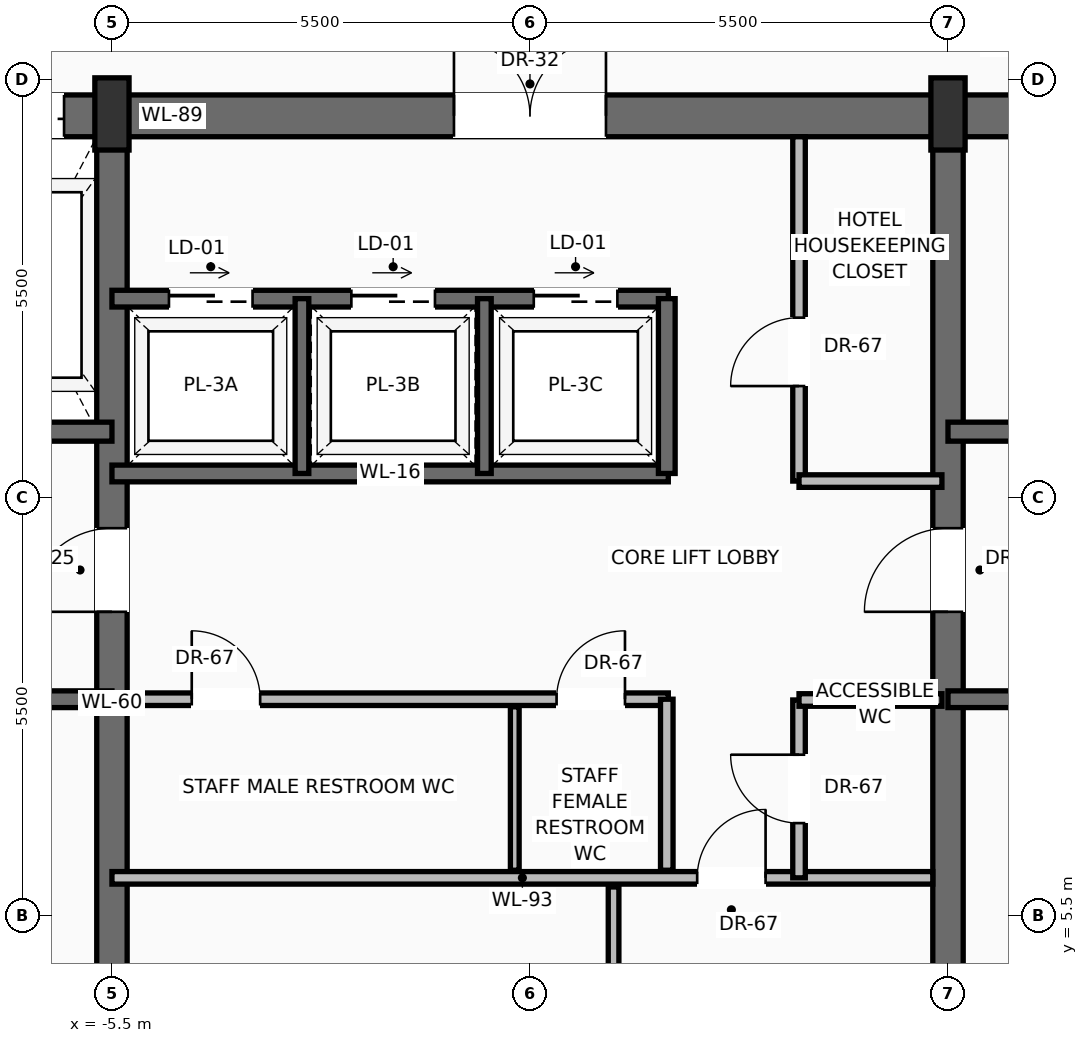
"""IFC4 building model, lengths in metres.
Left out: names, types, materials, properties, quantities, classifications, styles, units other than length and angle.
Written with IfcOpenShell. Run it as: python <this file> out.ifc"""

import sys

from ifc_helpers import new_model, si_unit, direction, frame, frame_2d, origin, origin_2d, place, context, subcontext, project, spatial, rectangle, extrude, source, transform, mapped, element, fill, save


model = new_model("IFC4")
c1 = context("Model", 3, precision=1e-05, world=origin(), true_north=direction((0.0, 1.0)))
c2 = subcontext(c1, "Body", "Model", "MODEL_VIEW")
j1 = project(units=[si_unit("LENGTHUNIT", "METRE"), si_unit("PLANEANGLEUNIT", "RADIAN")], contexts=[c1])
p1 = place(None, origin())
s1 = spatial("IfcSite", under=j1, at=p1, CompositionType="ELEMENT")
p2 = place(p1, origin())
s2 = spatial("IfcBuilding", under=s1, at=p2, CompositionType="ELEMENT")
p3 = place(p2, frame((0.0, 0.0, 223.45)))
s3 = spatial("IfcBuildingStorey", under=s2, at=p3, CompositionType="ELEMENT", Elevation=223.45)
p4 = place(p3, frame((-10.7, 16.025, 0.0), z_axis=(0.0, 0.0, 1.0), x_axis=(1.0, 0.0, 0.0)))
e1 = element("IfcWall", 1, at=p4, inside=s3, PredefinedType="SHEAR", context=c2, shape_type="SweptSolid", body=[
    extrude(rectangle(XDim=21.4, YDim=0.55, at=frame_2d((10.7, 0.0))), origin(), (0.0, 0.0, 1.0), 3.24),
])
p5 = place(p4, frame((3.27, 0.0, 0.0)))
e2 = element("IfcOpeningElement", 2, at=p5, cuts=e1, PredefinedType="OPENING", context=c2, shape_type="SweptSolid", body=[
    extrude(rectangle(XDim=1.3, YDim=2.3, at=frame_2d((0.65, 1.15))), frame((0.0, 0.285, 0.0), z_axis=(0.0, -1.0, 0.0), x_axis=(1.0, 0.0, 0.0)), (0.0, 0.0, 1.0), 0.57),
])
p6 = place(p4, frame((9.7, 0.0, 0.0)))
e3 = element("IfcOpeningElement", 3, at=p6, cuts=e1, PredefinedType="OPENING", context=c2, shape_type="SweptSolid", body=[
    extrude(rectangle(XDim=2.0, YDim=2.4, at=frame_2d((1.0, 1.2))), frame((0.0, 0.285, 0.0), z_axis=(0.0, -1.0, 0.0), x_axis=(1.0, 0.0, 0.0)), (0.0, 0.0, 1.0), 0.57),
])
p7 = place(p3, frame((-5.5, 0.575, 0.0), z_axis=(0.0, 0.0, 1.0), x_axis=(0.0, 1.0, 0.0)))
e4 = element("IfcWall", 4, at=p7, inside=s3, PredefinedType="SHEAR", context=c2, shape_type="SweptSolid", body=[
    extrude(rectangle(XDim=15.45, YDim=0.4, at=frame_2d((7.725, 0.0))), origin(), (0.0, 0.0, 1.0), 3.24),
])
p8 = place(p7, frame((8.925, 0.0, 0.0)))
e5 = element("IfcOpeningElement", 5, at=p8, cuts=e4, PredefinedType="OPENING", context=c2, shape_type="SweptSolid", body=[
    extrude(rectangle(XDim=1.1, YDim=2.2, at=frame_2d((0.55, 1.1))), frame((0.0, 0.21, 0.0), z_axis=(0.0, -1.0, 0.0), x_axis=(1.0, 0.0, 0.0)), (0.0, 0.0, 1.0), 0.42),
])
p9 = place(p3, frame((5.5, 0.575, 0.0), z_axis=(0.0, 0.0, 1.0), x_axis=(0.0, 1.0, 0.0)))
e6 = element("IfcWall", 6, at=p9, inside=s3, PredefinedType="SHEAR", context=c2, shape_type="SweptSolid", body=[
    extrude(rectangle(XDim=15.45, YDim=0.4, at=frame_2d((7.725, 0.0))), origin(), (0.0, 0.0, 1.0), 3.24),
])
p10 = place(p9, frame((8.925, 0.0, 0.0)))
e7 = element("IfcOpeningElement", 7, at=p10, cuts=e6, PredefinedType="OPENING", context=c2, shape_type="SweptSolid", body=[
    extrude(rectangle(XDim=1.1, YDim=2.2, at=frame_2d((0.55, 1.1))), frame((0.0, 0.21, 0.0), z_axis=(0.0, -1.0, 0.0), x_axis=(1.0, 0.0, 0.0)), (0.0, 0.0, 1.0), 0.42),
])
m1 = source(origin(), c2, "Body", "SweptSolid", [
    extrude(rectangle(XDim=0.45, YDim=0.95, at=origin_2d()), origin(), (0.0, 0.0, 1.0), 3.45),
])
for number, where, z_axis, x_axis in (
    (8, (-5.5, 16.05, 0.0), (0.0, 0.0, 1.0), (1.0, 0.0, 0.0)),
    (9, (5.5, 16.05, 0.0), (0.0, 0.0, 1.0), (1.0, 0.0, 0.0)),
):
    element("IfcColumn", number, at=place(p3, frame(where, z_axis=z_axis, x_axis=x_axis)), inside=s3, PredefinedType="PILASTER", context=c2, shape_type="MappedRepresentation", body=[
        mapped(m1, transform((0.0, 0.0, 0.0), scale=1.0)),
    ])
p11 = place(p3, frame((-5.5, 8.35, 0.0), z_axis=(0.0, 0.0, 1.0), x_axis=(-1.0, 0.0, 0.0)))
e10 = element("IfcWall", 10, at=p11, inside=s3, PredefinedType="SOLIDWALL", context=c2, shape_type="SweptSolid", body=[
    extrude(rectangle(XDim=4.65, YDim=0.22, at=frame_2d((2.325, 0.0))), origin(), (0.0, 0.0, 1.0), 3.24),
])
p12 = place(p11, frame((2.5, 0.0, 0.0)))
e11 = element("IfcOpeningElement", 11, at=p12, cuts=e10, PredefinedType="OPENING", context=c2, shape_type="SweptSolid", body=[
    extrude(rectangle(XDim=1.15, YDim=2.2, at=frame_2d((0.575, 1.1))), frame((0.0, 0.12, 0.0), z_axis=(0.0, -1.0, 0.0), x_axis=(1.0, 0.0, 0.0)), (0.0, 0.0, 1.0), 0.24),
])
p13 = place(p3, frame((-5.5, 11.87, 0.0), z_axis=(0.0, 0.0, 1.0), x_axis=(-1.0, 0.0, 0.0)))
e12 = element("IfcWall", 12, at=p13, inside=s3, PredefinedType="SOLIDWALL", context=c2, shape_type="SweptSolid", body=[
    extrude(rectangle(XDim=4.65, YDim=0.25, at=frame_2d((2.325, 0.0))), origin(), (0.0, 0.0, 1.0), 3.24),
])
p14 = place(p13, frame((2.95, 0.0, 0.0)))
e13 = element("IfcOpeningElement", 13, at=p14, cuts=e12, PredefinedType="OPENING", context=c2, shape_type="SweptSolid", body=[
    extrude(rectangle(XDim=1.2, YDim=2.25, at=frame_2d((0.6, 1.125))), frame((0.0, 0.135, 0.0), z_axis=(0.0, -1.0, 0.0), x_axis=(1.0, 0.0, 0.0)), (0.0, 0.0, 1.0), 0.27),
])
p15 = place(p3, frame((10.15, 8.35, 0.0), z_axis=(0.0, 0.0, 1.0), x_axis=(-1.0, 0.0, 0.0)))
e14 = element("IfcWall", 14, at=p15, inside=s3, PredefinedType="SOLIDWALL", context=c2, shape_type="SweptSolid", body=[
    extrude(rectangle(XDim=4.65, YDim=0.22, at=frame_2d((2.325, 0.0))), origin(), (0.0, 0.0, 1.0), 3.24),
])
p16 = place(p15, frame((1.0, 0.0, 0.0)))
e15 = element("IfcOpeningElement", 15, at=p16, cuts=e14, PredefinedType="OPENING", context=c2, shape_type="SweptSolid", body=[
    extrude(rectangle(XDim=1.15, YDim=2.2, at=frame_2d((0.575, 1.1))), frame((0.0, 0.12, 0.0), z_axis=(0.0, -1.0, 0.0), x_axis=(1.0, 0.0, 0.0)), (0.0, 0.0, 1.0), 0.24),
])
p17 = place(p3, frame((10.15, 11.87, 0.0), z_axis=(0.0, 0.0, 1.0), x_axis=(-1.0, 0.0, 0.0)))
e16 = element("IfcWall", 16, at=p17, inside=s3, PredefinedType="SOLIDWALL", context=c2, shape_type="SweptSolid", body=[
    extrude(rectangle(XDim=4.65, YDim=0.25, at=frame_2d((2.325, 0.0))), origin(), (0.0, 0.0, 1.0), 3.24),
])
p18 = place(p17, frame((0.5, 0.0, 0.0)))
e17 = element("IfcOpeningElement", 17, at=p18, cuts=e16, PredefinedType="OPENING", context=c2, shape_type="SweptSolid", body=[
    extrude(rectangle(XDim=1.2, YDim=2.25, at=frame_2d((0.6, 1.125))), frame((0.0, 0.135, 0.0), z_axis=(0.0, -1.0, 0.0), x_axis=(1.0, 0.0, 0.0)), (0.0, 0.0, 1.0), 0.27),
])
p19 = place(p3, frame((-5.5, 6.0, 0.0), z_axis=(0.0, 0.0, 1.0), x_axis=(1.0, 0.0, 0.0)))
e18 = element("IfcWall", 18, at=p19, inside=s3, PredefinedType="PARTITIONING", context=c2, shape_type="SweptSolid", body=[
    extrude(rectangle(XDim=10.8, YDim=0.165, at=frame_2d((5.4, 0.0))), origin(), (0.0, 0.0, 1.0), 3.232),
])
p20 = place(p19, frame((7.7, 0.0, 0.0)))
e19 = element("IfcOpeningElement", 19, at=p20, cuts=e18, PredefinedType="OPENING", context=c2, shape_type="SweptSolid", body=[
    extrude(rectangle(XDim=0.9, YDim=2.1, at=frame_2d((0.45, 1.05))), frame((0.0, 0.093, 0.0), z_axis=(0.0, -1.0, 0.0), x_axis=(1.0, 0.0, 0.0)), (0.0, 0.0, 1.0), 0.185),
])
p21 = place(p3, frame((1.1, 0.85, 0.0), z_axis=(0.0, 0.0, 1.0), x_axis=(0.0, 1.0, 0.0)))
e20 = element("IfcWall", 20, at=p21, inside=s3, PredefinedType="PARTITIONING", context=c2, shape_type="SweptSolid", body=[
    extrude(rectangle(XDim=5.03, YDim=0.14, at=frame_2d((2.515, 0.0))), origin(), (0.0, 0.0, 1.0), 3.232),
])
p22 = place(p21, frame((2.1, 0.0, 0.0)))
e21 = element("IfcOpeningElement", 21, at=p22, cuts=e20, PredefinedType="OPENING", context=c2, shape_type="SweptSolid", body=[
    extrude(rectangle(XDim=0.9, YDim=2.1, at=frame_2d((0.45, 1.05))), frame((0.0, 0.08, 0.0), z_axis=(0.0, -1.0, 0.0), x_axis=(1.0, 0.0, 0.0)), (0.0, 0.0, 1.0), 0.16),
])
p23 = place(p3, frame((3.54, 6.0, 0.0), z_axis=(0.0, 0.0, 1.0), x_axis=(0.0, 1.0, 0.0)))
e22 = element("IfcWall", 22, at=p23, inside=s3, PredefinedType="PARTITIONING", context=c2, shape_type="SweptSolid", body=[
    extrude(rectangle(XDim=2.34, YDim=0.165, at=frame_2d((1.17, 0.0))), origin(), (0.0, 0.0, 1.0), 3.232),
])
p24 = place(p23, frame((0.72, 0.0, 0.0)))
e23 = element("IfcOpeningElement", 23, at=p24, cuts=e22, PredefinedType="OPENING", context=c2, shape_type="SweptSolid", body=[
    extrude(rectangle(XDim=0.9, YDim=2.1, at=frame_2d((0.45, 1.05))), frame((0.0, 0.093, 0.0), z_axis=(0.0, -1.0, 0.0), x_axis=(1.0, 0.0, 0.0)), (0.0, 0.0, 1.0), 0.185),
])
p25 = place(p3, frame((3.54, 8.34, 0.0), z_axis=(0.0, 0.0, 1.0), x_axis=(1.0, 0.0, 0.0)))
e24 = element("IfcWall", 24, at=p25, inside=s3, PredefinedType="PARTITIONING", context=c2, shape_type="SweptSolid", body=[
    extrude(rectangle(XDim=1.88, YDim=0.165, at=frame_2d((0.94, 0.0))), origin(), (0.0, 0.0, 1.0), 3.232),
])
p26 = place(p3, frame((-5.3, 8.35, 0.0), z_axis=(0.0, 0.0, 1.0), x_axis=(1.0, 0.0, 0.0)))
e25 = element("IfcWall", 25, at=p26, inside=s3, PredefinedType="PARTITIONING", context=c2, shape_type="SweptSolid", body=[
    extrude(rectangle(XDim=7.12, YDim=0.165, at=frame_2d((3.56, 0.0))), origin(), (0.0, 0.0, 1.0), 3.232),
])
p27 = place(p26, frame((0.85, 0.0, 0.0)))
e26 = element("IfcOpeningElement", 26, at=p27, cuts=e25, PredefinedType="OPENING", context=c2, shape_type="SweptSolid", body=[
    extrude(rectangle(XDim=0.9, YDim=2.1, at=frame_2d((0.45, 1.05))), frame((0.0, 0.093, 0.0), z_axis=(0.0, -1.0, 0.0), x_axis=(1.0, 0.0, 0.0)), (0.0, 0.0, 1.0), 0.185),
])
p28 = place(p26, frame((5.65, 0.0, 0.0)))
e27 = element("IfcOpeningElement", 27, at=p28, cuts=e25, PredefinedType="OPENING", context=c2, shape_type="SweptSolid", body=[
    extrude(rectangle(XDim=0.9, YDim=2.1, at=frame_2d((0.45, 1.05))), frame((0.0, 0.093, 0.0), z_axis=(0.0, -1.0, 0.0), x_axis=(1.0, 0.0, 0.0)), (0.0, 0.0, 1.0), 0.185),
])
p29 = place(p3, frame((1.8, 6.1, 0.0), z_axis=(0.0, 0.0, 1.0), x_axis=(0.0, 1.0, 0.0)))
e28 = element("IfcWall", 28, at=p29, inside=s3, PredefinedType="PARTITIONING", context=c2, shape_type="SweptSolid", body=[
    extrude(rectangle(XDim=2.25, YDim=0.165, at=frame_2d((1.125, 0.0))), origin(), (0.0, 0.0, 1.0), 3.232),
])
p30 = place(p3, frame((-0.2, 6.1, 0.0), z_axis=(0.0, 0.0, 1.0), x_axis=(0.0, 1.0, 0.0)))
e29 = element("IfcWall", 29, at=p30, inside=s3, PredefinedType="PARTITIONING", context=c2, shape_type="SweptSolid", body=[
    extrude(rectangle(XDim=2.15, YDim=0.115, at=frame_2d((1.075, 0.0))), origin(), (0.0, 0.0, 1.0), 3.232),
])
p31 = place(p3, frame((-5.5, 11.32, 0.0), z_axis=(0.0, 0.0, 1.0), x_axis=(1.0, 0.0, 0.0)))
e30 = element("IfcWall", 30, at=p31, inside=s3, PredefinedType="SOLIDWALL", context=c2, shape_type="SweptSolid", body=[
    extrude(rectangle(XDim=7.32, YDim=0.22, at=frame_2d((3.66, 0.0))), origin(), (0.0, 0.0, 1.0), 3.24),
])
p32 = place(p3, frame((-5.5, 13.62, 0.0), z_axis=(0.0, 0.0, 1.0), x_axis=(1.0, 0.0, 0.0)))
e31 = element("IfcWall", 31, at=p32, inside=s3, PredefinedType="SOLIDWALL", context=c2, shape_type="SweptSolid", body=[
    extrude(rectangle(XDim=7.32, YDim=0.22, at=frame_2d((3.66, 0.0))), origin(), (0.0, 0.0, 1.0), 3.24),
])
p33 = place(p32, frame((0.75, 0.0, 0.0)))
e32 = element("IfcOpeningElement", 32, at=p33, cuts=e31, PredefinedType="OPENING", context=c2, shape_type="SweptSolid", body=[
    extrude(rectangle(XDim=1.1, YDim=2.2, at=frame_2d((0.55, 1.1))), frame((0.0, 0.12, 0.0), z_axis=(0.0, -1.0, 0.0), x_axis=(1.0, 0.0, 0.0)), (0.0, 0.0, 1.0), 0.24),
])
p34 = place(p32, frame((3.15, 0.0, 0.0)))
e33 = element("IfcOpeningElement", 33, at=p34, cuts=e31, PredefinedType="OPENING", context=c2, shape_type="SweptSolid", body=[
    extrude(rectangle(XDim=1.1, YDim=2.2, at=frame_2d((0.55, 1.1))), frame((0.0, 0.12, 0.0), z_axis=(0.0, -1.0, 0.0), x_axis=(1.0, 0.0, 0.0)), (0.0, 0.0, 1.0), 0.24),
])
p35 = place(p32, frame((5.55, 0.0, 0.0)))
e34 = element("IfcOpeningElement", 34, at=p35, cuts=e31, PredefinedType="OPENING", context=c2, shape_type="SweptSolid", body=[
    extrude(rectangle(XDim=1.1, YDim=2.2, at=frame_2d((0.55, 1.1))), frame((0.0, 0.12, 0.0), z_axis=(0.0, -1.0, 0.0), x_axis=(1.0, 0.0, 0.0)), (0.0, 0.0, 1.0), 0.24),
])
p36 = place(p3, frame((1.8, 11.32, 0.0), z_axis=(0.0, 0.0, 1.0), x_axis=(0.0, 1.0, 0.0)))
e35 = element("IfcWall", 35, at=p36, inside=s3, PredefinedType="SOLIDWALL", context=c2, shape_type="SweptSolid", body=[
    extrude(rectangle(XDim=2.3, YDim=0.22, at=frame_2d((1.15, 0.0))), origin(), (0.0, 0.0, 1.0), 3.24),
])
for number, where, z_axis, x_axis in (
    (36, (-3.0, 11.32, 0.0), (0.0, 0.0, 1.0), (0.0, 1.0, 0.0)),
    (37, (-0.6, 11.32, 0.0), (0.0, 0.0, 1.0), (0.0, 1.0, 0.0)),
):
    element("IfcWall", number, at=place(p3, frame(where, z_axis=z_axis, x_axis=x_axis)), inside=s3, PredefinedType="SOLIDWALL", context=c2, shape_type="SweptSolid", body=[
        extrude(rectangle(XDim=2.3, YDim=0.18, at=frame_2d((1.15, 0.0))), origin(), (0.0, 0.0, 1.0), 3.24),
    ])
p37 = place(p3, frame((3.54, 11.22, 0.0), z_axis=(0.0, 0.0, 1.0), x_axis=(0.0, 1.0, 0.0)))
e38 = element("IfcWall", 38, at=p37, inside=s3, PredefinedType="PARTITIONING", context=c2, shape_type="SweptSolid", body=[
    extrude(rectangle(XDim=4.53, YDim=0.165, at=frame_2d((2.265, 0.0))), origin(), (0.0, 0.0, 1.0), 3.232),
])
p38 = place(p37, frame((1.25, 0.0, 0.0)))
e39 = element("IfcOpeningElement", 39, at=p38, cuts=e38, PredefinedType="OPENING", context=c2, shape_type="SweptSolid", body=[
    extrude(rectangle(XDim=0.9, YDim=2.1, at=frame_2d((0.45, 1.05))), frame((0.0, 0.093, 0.0), z_axis=(0.0, -1.0, 0.0), x_axis=(1.0, 0.0, 0.0)), (0.0, 0.0, 1.0), 0.185),
])
p39 = place(p3, frame((3.54, 11.22, 0.0), z_axis=(0.0, 0.0, 1.0), x_axis=(1.0, 0.0, 0.0)))
e40 = element("IfcWall", 40, at=p39, inside=s3, PredefinedType="PARTITIONING", context=c2, shape_type="SweptSolid", body=[
    extrude(rectangle(XDim=1.88, YDim=0.165, at=frame_2d((0.94, 0.0))), origin(), (0.0, 0.0, 1.0), 3.232),
])
m2 = source(origin(), c2, "Body", "SweptSolid", [
    extrude(rectangle(XDim=1.1, YDim=2.2, at=frame_2d((0.55, 1.1))), frame((0.0, 0.025, 0.0), z_axis=(0.0, -1.0, 0.0), x_axis=(1.0, 0.0, 0.0)), (0.0, 0.0, 1.0), 0.05),
])
p40 = place(p8, origin())
e41 = element("IfcDoor", 41, at=p40, inside=s3, OperationType="SINGLE_SWING_LEFT", PredefinedType="DOOR", context=c2, shape_type="MappedRepresentation", body=[
    mapped(m2, transform((0.0, 0.0, 0.0), scale=1.0)),
])
fill(e5, e41)
m3 = source(origin(), c2, "Body", "SweptSolid", [
    extrude(rectangle(XDim=1.3, YDim=2.3, at=frame_2d((0.65, 1.15))), frame((0.0, 0.025, 0.0), z_axis=(0.0, -1.0, 0.0), x_axis=(1.0, 0.0, 0.0)), (0.0, 0.0, 1.0), 0.05),
])
p41 = place(p5, origin())
e42 = element("IfcDoor", 42, at=p41, inside=s3, OperationType="SLIDING_TO_RIGHT", PredefinedType="DOOR", context=c2, shape_type="MappedRepresentation", body=[
    mapped(m3, transform((0.0, 0.0, 0.0), scale=1.0)),
])
fill(e2, e42)
p42 = place(p10, origin())
e43 = element("IfcDoor", 43, at=p42, inside=s3, OperationType="SINGLE_SWING_LEFT", PredefinedType="DOOR", context=c2, shape_type="MappedRepresentation", body=[
    mapped(m2, transform((0.0, 0.0, 0.0), scale=1.0)),
])
fill(e7, e43)
m4 = source(origin(), c2, "Body", "SweptSolid", [
    extrude(rectangle(XDim=2.0, YDim=2.4, at=frame_2d((1.0, 1.2))), frame((0.0, 0.025, 0.0), z_axis=(0.0, -1.0, 0.0), x_axis=(1.0, 0.0, 0.0)), (0.0, 0.0, 1.0), 0.05),
])
p43 = place(p6, origin())
e44 = element("IfcDoor", 44, at=p43, inside=s3, OperationType="DOUBLE_DOOR_SINGLE_SWING", PredefinedType="DOOR", context=c2, shape_type="MappedRepresentation", body=[
    mapped(m4, transform((0.0, 0.0, 0.0), scale=1.0)),
])
fill(e3, e44)
m5 = source(origin(), c2, "Body", "SweptSolid", [
    extrude(rectangle(XDim=0.9, YDim=2.1, at=frame_2d((0.45, 1.05))), frame((0.0, 0.025, 0.0), z_axis=(0.0, -1.0, 0.0), x_axis=(1.0, 0.0, 0.0)), (0.0, 0.0, 1.0), 0.05),
])
p44 = place(p20, origin())
e45 = element("IfcDoor", 45, at=p44, inside=s3, OperationType="SINGLE_SWING_RIGHT", PredefinedType="DOOR", context=c2, shape_type="MappedRepresentation", body=[
    mapped(m5, transform((0.0, 0.0, 0.0), scale=1.0)),
])
fill(e19, e45)
p45 = place(p24, origin())
e46 = element("IfcDoor", 46, at=p45, inside=s3, OperationType="SINGLE_SWING_RIGHT", PredefinedType="DOOR", context=c2, shape_type="MappedRepresentation", body=[
    mapped(m5, transform((0.0, 0.0, 0.0), scale=1.0)),
])
fill(e23, e46)
p46 = place(p27, origin())
e47 = element("IfcDoor", 47, at=p46, inside=s3, OperationType="SINGLE_SWING_LEFT", PredefinedType="DOOR", context=c2, shape_type="MappedRepresentation", body=[
    mapped(m5, transform((0.0, 0.0, 0.0), scale=1.0)),
])
fill(e26, e47)
p47 = place(p28, origin())
e48 = element("IfcDoor", 48, at=p47, inside=s3, OperationType="SINGLE_SWING_RIGHT", PredefinedType="DOOR", context=c2, shape_type="MappedRepresentation", body=[
    mapped(m5, transform((0.0, 0.0, 0.0), scale=1.0)),
])
fill(e27, e48)
m6 = source(origin(), c2, "Body", "SweptSolid", [
    extrude(rectangle(XDim=1.1, YDim=2.2, at=frame_2d((0.55, 1.1))), frame((0.0, 0.025, 0.0), z_axis=(0.0, -1.0, 0.0), x_axis=(1.0, 0.0, 0.0)), (0.0, 0.0, 1.0), 0.05),
])
p48 = place(p33, origin())
e49 = element("IfcDoor", 49, at=p48, inside=s3, OperationType="SLIDING_TO_RIGHT", PredefinedType="DOOR", context=c2, shape_type="MappedRepresentation", body=[
    mapped(m6, transform((0.0, 0.0, 0.0), scale=1.0)),
])
fill(e32, e49)
p49 = place(p34, origin())
e50 = element("IfcDoor", 50, at=p49, inside=s3, OperationType="SLIDING_TO_RIGHT", PredefinedType="DOOR", context=c2, shape_type="MappedRepresentation", body=[
    mapped(m6, transform((0.0, 0.0, 0.0), scale=1.0)),
])
fill(e33, e50)
p50 = place(p35, origin())
e51 = element("IfcDoor", 51, at=p50, inside=s3, OperationType="SLIDING_TO_RIGHT", PredefinedType="DOOR", context=c2, shape_type="MappedRepresentation", body=[
    mapped(m6, transform((0.0, 0.0, 0.0), scale=1.0)),
])
fill(e34, e51)
p51 = place(p38, origin())
e52 = element("IfcDoor", 52, at=p51, inside=s3, OperationType="SINGLE_SWING_LEFT", PredefinedType="DOOR", context=c2, shape_type="MappedRepresentation", body=[
    mapped(m5, transform((0.0, 0.0, 0.0), scale=1.0)),
])
fill(e39, e52)
save(model, sys.argv[1])
